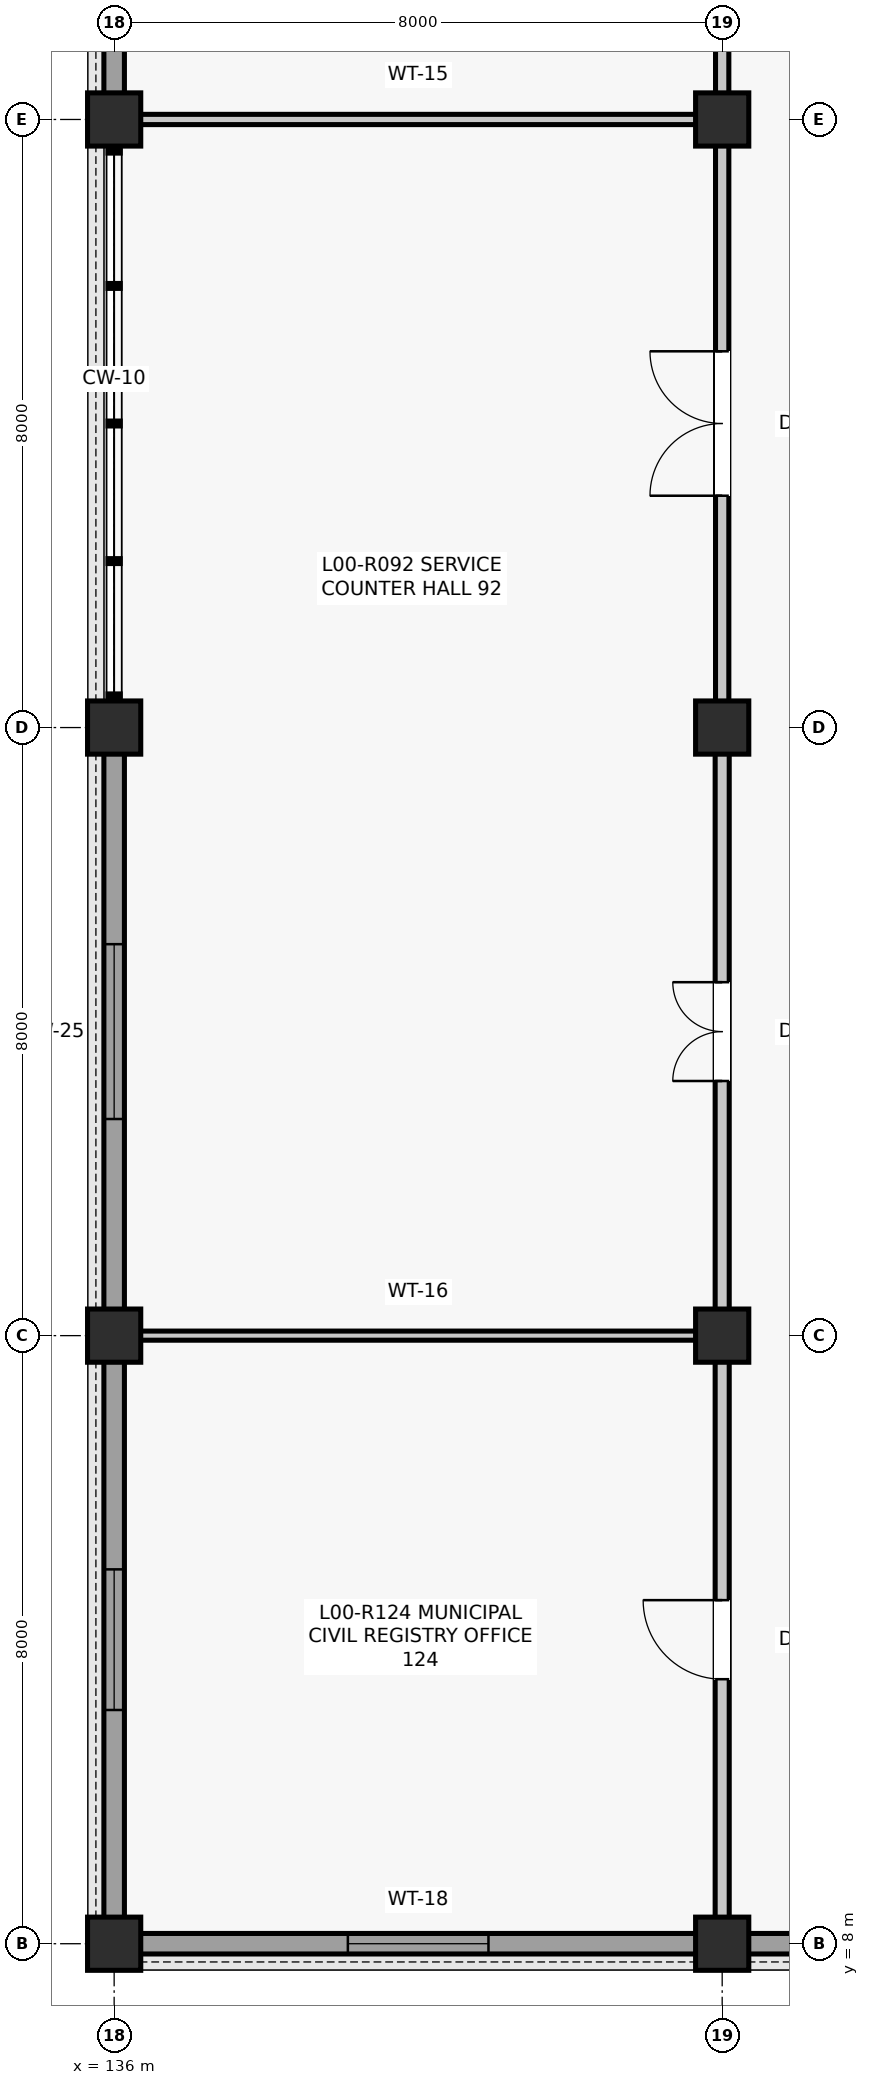
"""IFC4 building model, lengths in metres.
Left out: names, types, materials, properties, quantities, classifications, styles, units other than length and angle.
Written with IfcOpenShell. Run it as: python <this file> out.ifc"""

import sys

from ifc_helpers import new_model, si_unit, direction, frame, frame_2d, origin, origin_2d, place, context, subcontext, project, spatial, rectangle, extrude, element, fill, save


model = new_model("IFC4")
c1 = context("Model", 3, precision=1e-05, world=origin(), true_north=direction((0.0, 1.0)))
c2 = subcontext(c1, "Body", "Model", "MODEL_VIEW")
j1 = project(units=[si_unit("LENGTHUNIT", "METRE"), si_unit("PLANEANGLEUNIT", "RADIAN")], contexts=[c1])
p1 = place(None, origin())
s1 = spatial("IfcSite", under=j1, at=p1, CompositionType="ELEMENT")
p2 = place(p1, origin())
s2 = spatial("IfcBuilding", under=s1, at=p2, CompositionType="ELEMENT")
p3 = place(p2, origin())
s3 = spatial("IfcBuildingStorey", under=s2, at=p3, CompositionType="ELEMENT", Elevation=0.0)
for number, where, z_axis, x_axis in (
    (1, (136.0, 8.0, 0.0), (0.0, 0.0, 1.0), (1.0, 0.0, 0.0)),
    (2, (136.0, 16.0, 0.0), (0.0, 0.0, 1.0), (1.0, 0.0, 0.0)),
    (3, (136.0, 24.0, 0.0), (0.0, 0.0, 1.0), (1.0, 0.0, 0.0)),
    (4, (136.0, 32.0, 0.0), (0.0, 0.0, 1.0), (1.0, 0.0, 0.0)),
    (5, (144.0, 8.0, 0.0), (0.0, 0.0, 1.0), (1.0, 0.0, 0.0)),
    (6, (144.0, 16.0, 0.0), (0.0, 0.0, 1.0), (1.0, 0.0, 0.0)),
    (7, (144.0, 24.0, 0.0), (0.0, 0.0, 1.0), (1.0, 0.0, 0.0)),
    (8, (144.0, 32.0, 0.0), (0.0, 0.0, 1.0), (1.0, 0.0, 0.0)),
):
    element("IfcColumn", number, at=place(p3, frame(where, z_axis=z_axis, x_axis=x_axis)), inside=s3, PredefinedType="COLUMN", context=c2, shape_type="SweptSolid", body=[
        extrude(rectangle(XDim=0.7, YDim=0.7, at=origin_2d()), origin(), (0.0, 0.0, 1.0), 5.28),
    ])
p4 = place(p3, frame((136.335, 8.0, 0.0), z_axis=(0.0, 0.0, 1.0), x_axis=(1.0, 0.0, 0.0)))
e9 = element("IfcWall", 9, at=p4, inside=s3, PredefinedType="SOLIDWALL", context=c2, shape_type="SweptSolid", body=[
    extrude(rectangle(XDim=7.33, YDim=0.27, at=frame_2d((3.665, 0.0))), origin(), (0.0, 0.0, 1.0), 4.614),
])
p5 = place(p4, frame((2.74, 0.0, 0.9)))
e10 = element("IfcOpeningElement", 10, at=p5, cuts=e9, PredefinedType="OPENING", context=c2, shape_type="SweptSolid", body=[
    extrude(rectangle(XDim=1.85, YDim=2.65, at=frame_2d((0.925, 1.325))), frame((0.0, 0.145, 0.0), z_axis=(0.0, -1.0, 0.0), x_axis=(1.0, 0.0, 0.0)), (0.0, 0.0, 1.0), 0.29),
])
p6 = place(p3, frame((136.0, 8.335, 0.0), z_axis=(0.0, 0.0, 1.0), x_axis=(0.0, 1.0, 0.0)))
e11 = element("IfcWall", 11, at=p6, inside=s3, PredefinedType="SOLIDWALL", context=c2, shape_type="SweptSolid", body=[
    extrude(rectangle(XDim=7.33, YDim=0.27, at=frame_2d((3.665, 0.0))), origin(), (0.0, 0.0, 1.0), 4.614),
])
p7 = place(p6, frame((2.74, 0.0, 0.9)))
e12 = element("IfcOpeningElement", 12, at=p7, cuts=e11, PredefinedType="OPENING", context=c2, shape_type="SweptSolid", body=[
    extrude(rectangle(XDim=1.85, YDim=2.65, at=frame_2d((0.925, 1.325))), frame((0.0, 0.145, 0.0), z_axis=(0.0, -1.0, 0.0), x_axis=(1.0, 0.0, 0.0)), (0.0, 0.0, 1.0), 0.29),
])
p8 = place(p3, frame((136.0, 16.335, 0.0), z_axis=(0.0, 0.0, 1.0), x_axis=(0.0, 1.0, 0.0)))
e13 = element("IfcWall", 13, at=p8, inside=s3, PredefinedType="SOLIDWALL", context=c2, shape_type="SweptSolid", body=[
    extrude(rectangle(XDim=7.33, YDim=0.27, at=frame_2d((3.665, 0.0))), origin(), (0.0, 0.0, 1.0), 4.677),
])
p9 = place(p8, frame((2.515, 0.0, 0.9)))
e14 = element("IfcOpeningElement", 14, at=p9, cuts=e13, PredefinedType="OPENING", context=c2, shape_type="SweptSolid", body=[
    extrude(rectangle(XDim=2.3, YDim=2.55, at=frame_2d((1.15, 1.275))), frame((0.0, 0.145, 0.0), z_axis=(0.0, -1.0, 0.0), x_axis=(1.0, 0.0, 0.0)), (0.0, 0.0, 1.0), 0.29),
])
p10 = place(p3, frame((136.0, 32.335, 0.0), z_axis=(0.0, 0.0, 1.0), x_axis=(0.0, 1.0, 0.0)))
e15 = element("IfcWall", 15, at=p10, inside=s3, PredefinedType="SOLIDWALL", context=c2, shape_type="SweptSolid", body=[
    extrude(rectangle(XDim=7.33, YDim=0.27, at=frame_2d((3.665, 0.0))), origin(), (0.0, 0.0, 1.0), 4.674),
])
p11 = place(p10, frame((2.59, 0.0, 0.9)))
e16 = element("IfcOpeningElement", 16, at=p11, cuts=e15, PredefinedType="OPENING", context=c2, shape_type="SweptSolid", body=[
    extrude(rectangle(XDim=2.15, YDim=2.8, at=frame_2d((1.075, 1.4))), frame((0.0, 0.145, 0.0), z_axis=(0.0, -1.0, 0.0), x_axis=(1.0, 0.0, 0.0)), (0.0, 0.0, 1.0), 0.29),
])
p12 = place(p3, frame((144.335, 8.0, 0.0), z_axis=(0.0, 0.0, 1.0), x_axis=(1.0, 0.0, 0.0)))
e17 = element("IfcWall", 17, at=p12, inside=s3, PredefinedType="SOLIDWALL", context=c2, shape_type="SweptSolid", body=[
    extrude(rectangle(XDim=7.33, YDim=0.27, at=frame_2d((3.665, 0.0))), origin(), (0.0, 0.0, 1.0), 4.677),
])
p13 = place(p12, frame((0.644, 0.0, 0.95)))
e18 = element("IfcOpeningElement", 18, at=p13, cuts=e17, PredefinedType="OPENING", context=c2, shape_type="SweptSolid", body=[
    extrude(rectangle(XDim=1.35, YDim=1.9, at=frame_2d((0.675, 0.95))), frame((0.0, 0.145, 0.0), z_axis=(0.0, -1.0, 0.0), x_axis=(1.0, 0.0, 0.0)), (0.0, 0.0, 1.0), 0.29),
])
p14 = place(p12, frame((5.336, 0.0, 0.95)))
e19 = element("IfcOpeningElement", 19, at=p14, cuts=e17, PredefinedType="OPENING", context=c2, shape_type="SweptSolid", body=[
    extrude(rectangle(XDim=1.35, YDim=1.9, at=frame_2d((0.675, 0.95))), frame((0.0, 0.145, 0.0), z_axis=(0.0, -1.0, 0.0), x_axis=(1.0, 0.0, 0.0)), (0.0, 0.0, 1.0), 0.29),
])
p15 = place(p3, frame((144.0, 8.34, 0.0), z_axis=(0.0, 0.0, 1.0), x_axis=(0.0, 1.0, 0.0)))
e20 = element("IfcWall", 20, at=p15, inside=s3, PredefinedType="PARTITIONING", context=c2, shape_type="SweptSolid", body=[
    extrude(rectangle(XDim=7.32, YDim=0.185, at=frame_2d((3.66, 0.0))), origin(), (0.0, 0.0, 1.0), 4.471),
])
p16 = place(p15, frame((3.14, 0.0, 0.0)))
e21 = element("IfcOpeningElement", 21, at=p16, cuts=e20, PredefinedType="OPENING", context=c2, shape_type="SweptSolid", body=[
    extrude(rectangle(XDim=1.04, YDim=2.18, at=frame_2d((0.52, 1.09))), frame((0.0, 0.103, 0.0), z_axis=(0.0, -1.0, 0.0), x_axis=(1.0, 0.0, 0.0)), (0.0, 0.0, 1.0), 0.205),
])
p17 = place(p3, frame((136.34, 16.0, 0.0), z_axis=(0.0, 0.0, 1.0), x_axis=(1.0, 0.0, 0.0)))
e22 = element("IfcWall", 22, at=p17, inside=s3, PredefinedType="PARTITIONING", context=c2, shape_type="SweptSolid", body=[
    extrude(rectangle(XDim=7.32, YDim=0.12, at=frame_2d((3.66, 0.0))), origin(), (0.0, 0.0, 1.0), 4.404),
])
p18 = place(p3, frame((144.0, 16.34, 0.0), z_axis=(0.0, 0.0, 1.0), x_axis=(0.0, 1.0, 0.0)))
e23 = element("IfcWall", 23, at=p18, inside=s3, PredefinedType="PARTITIONING", context=c2, shape_type="SweptSolid", body=[
    extrude(rectangle(XDim=7.32, YDim=0.185, at=frame_2d((3.66, 0.0))), origin(), (0.0, 0.0, 1.0), 4.603),
])
p19 = place(p18, frame((3.01, 0.0, 0.0)))
e24 = element("IfcOpeningElement", 24, at=p19, cuts=e23, PredefinedType="OPENING", context=c2, shape_type="SweptSolid", body=[
    extrude(rectangle(XDim=1.3, YDim=2.2, at=frame_2d((0.65, 1.1))), frame((0.0, 0.103, 0.0), z_axis=(0.0, -1.0, 0.0), x_axis=(1.0, 0.0, 0.0)), (0.0, 0.0, 1.0), 0.205),
])
p20 = place(p3, frame((144.0, 24.34, 0.0), z_axis=(0.0, 0.0, 1.0), x_axis=(0.0, 1.0, 0.0)))
e25 = element("IfcWall", 25, at=p20, inside=s3, PredefinedType="PARTITIONING", context=c2, shape_type="SweptSolid", body=[
    extrude(rectangle(XDim=7.32, YDim=0.175, at=frame_2d((3.66, 0.0))), origin(), (0.0, 0.0, 1.0), 4.667),
])
p21 = place(p20, frame((2.71, 0.0, 0.0)))
e26 = element("IfcOpeningElement", 26, at=p21, cuts=e25, PredefinedType="OPENING", context=c2, shape_type="SweptSolid", body=[
    extrude(rectangle(XDim=1.9, YDim=2.38, at=frame_2d((0.95, 1.19))), frame((0.0, 0.097, 0.0), z_axis=(0.0, -1.0, 0.0), x_axis=(1.0, 0.0, 0.0)), (0.0, 0.0, 1.0), 0.195),
])
p22 = place(p3, frame((136.34, 32.0, 0.0), z_axis=(0.0, 0.0, 1.0), x_axis=(1.0, 0.0, 0.0)))
e27 = element("IfcWall", 27, at=p22, inside=s3, PredefinedType="PARTITIONING", context=c2, shape_type="SweptSolid", body=[
    extrude(rectangle(XDim=7.32, YDim=0.135, at=frame_2d((3.66, 0.0))), origin(), (0.0, 0.0, 1.0), 4.403),
])
p23 = place(p3, frame((144.0, 32.34, 0.0), z_axis=(0.0, 0.0, 1.0), x_axis=(0.0, 1.0, 0.0)))
e28 = element("IfcWall", 28, at=p23, inside=s3, PredefinedType="PARTITIONING", context=c2, shape_type="SweptSolid", body=[
    extrude(rectangle(XDim=7.32, YDim=0.175, at=frame_2d((3.66, 0.0))), origin(), (0.0, 0.0, 1.0), 4.404),
])
p24 = place(p23, frame((3.135, 0.0, 0.0)))
e29 = element("IfcOpeningElement", 29, at=p24, cuts=e28, PredefinedType="OPENING", context=c2, shape_type="SweptSolid", body=[
    extrude(rectangle(XDim=1.05, YDim=2.15, at=frame_2d((0.525, 1.075))), frame((0.0, 0.097, 0.0), z_axis=(0.0, -1.0, 0.0), x_axis=(1.0, 0.0, 0.0)), (0.0, 0.0, 1.0), 0.195),
])
p25 = place(p5, origin())
e30 = element("IfcWindow", 30, at=p25, inside=s3, PartitioningType="SINGLE_PANEL", PredefinedType="WINDOW", context=c2, shape_type="SweptSolid", body=[
    extrude(rectangle(XDim=1.85, YDim=2.65, at=frame_2d((0.925, 1.325))), frame((0.0, 0.03, 0.0), z_axis=(0.0, -1.0, 0.0), x_axis=(1.0, 0.0, 0.0)), (0.0, 0.0, 1.0), 0.06),
])
fill(e10, e30)
p26 = place(p7, origin())
e31 = element("IfcWindow", 31, at=p26, inside=s3, PartitioningType="SINGLE_PANEL", PredefinedType="WINDOW", context=c2, shape_type="SweptSolid", body=[
    extrude(rectangle(XDim=1.85, YDim=2.65, at=frame_2d((0.925, 1.325))), frame((0.0, 0.03, 0.0), z_axis=(0.0, -1.0, 0.0), x_axis=(1.0, 0.0, 0.0)), (0.0, 0.0, 1.0), 0.06),
])
fill(e12, e31)
p27 = place(p9, origin())
e32 = element("IfcWindow", 32, at=p27, inside=s3, PartitioningType="SINGLE_PANEL", PredefinedType="WINDOW", context=c2, shape_type="SweptSolid", body=[
    extrude(rectangle(XDim=2.3, YDim=2.55, at=frame_2d((1.15, 1.275))), frame((0.0, 0.03, 0.0), z_axis=(0.0, -1.0, 0.0), x_axis=(1.0, 0.0, 0.0)), (0.0, 0.0, 1.0), 0.06),
])
fill(e14, e32)
p28 = place(p16, origin())
e33 = element("IfcDoor", 33, at=p28, inside=s3, OperationType="SINGLE_SWING_RIGHT", PredefinedType="DOOR", context=c2, shape_type="SweptSolid", body=[
    extrude(rectangle(XDim=1.04, YDim=2.18, at=frame_2d((0.52, 1.09))), frame((0.0, 0.025, 0.0), z_axis=(0.0, -1.0, 0.0), x_axis=(1.0, 0.0, 0.0)), (0.0, 0.0, 1.0), 0.05),
])
fill(e21, e33)
p29 = place(p19, origin())
e34 = element("IfcDoor", 34, at=p29, inside=s3, OperationType="DOUBLE_DOOR_SINGLE_SWING", PredefinedType="DOOR", context=c2, shape_type="SweptSolid", body=[
    extrude(rectangle(XDim=1.3, YDim=2.2, at=frame_2d((0.65, 1.1))), frame((0.0, 0.025, 0.0), z_axis=(0.0, -1.0, 0.0), x_axis=(1.0, 0.0, 0.0)), (0.0, 0.0, 1.0), 0.05),
])
fill(e24, e34)
p30 = place(p21, origin())
e35 = element("IfcDoor", 35, at=p30, inside=s3, OperationType="DOUBLE_DOOR_SINGLE_SWING", PredefinedType="DOOR", context=c2, shape_type="SweptSolid", body=[
    extrude(rectangle(XDim=1.9, YDim=2.38, at=frame_2d((0.95, 1.19))), frame((0.0, 0.025, 0.0), z_axis=(0.0, -1.0, 0.0), x_axis=(1.0, 0.0, 0.0)), (0.0, 0.0, 1.0), 0.05),
])
fill(e26, e35)
save(model, sys.argv[1])
